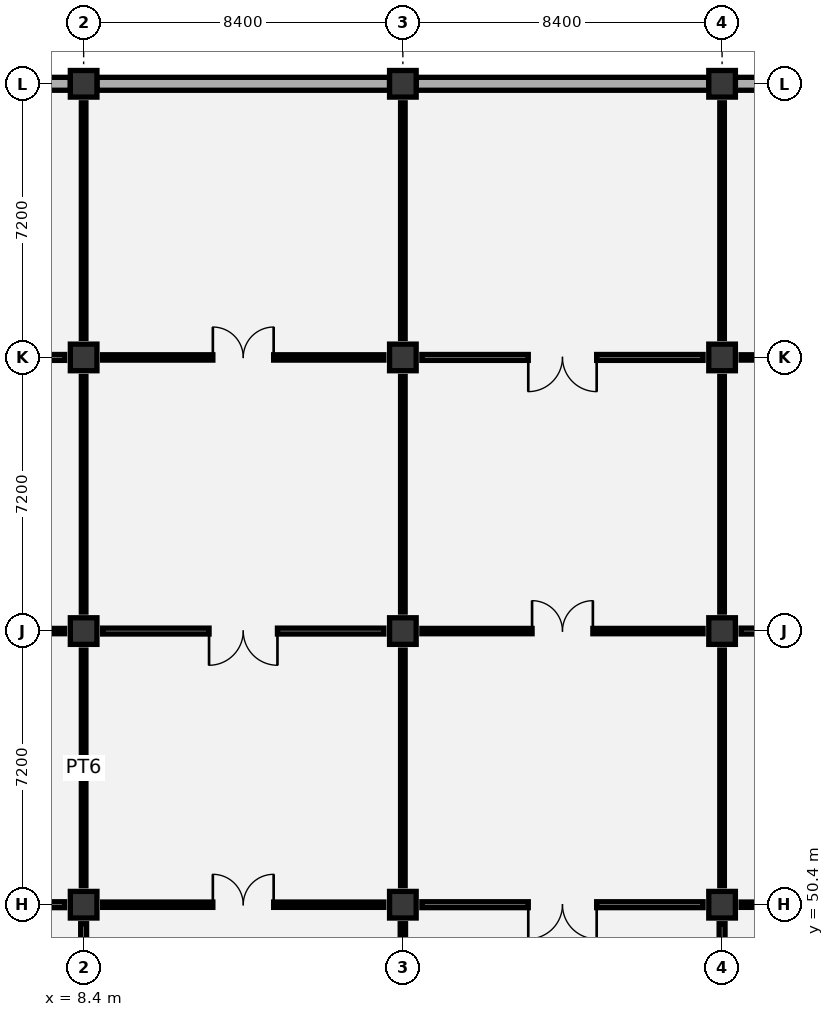
"""IFC4 building model, lengths in metres.
Left out: names, types, materials, properties, quantities, classifications, styles, units other than length and angle.
Written with IfcOpenShell. Run it as: python <this file> out.ifc"""

import sys

from ifc_helpers import new_model, si_unit, direction, frame, frame_2d, origin, origin_2d, place, context, subcontext, project, spatial, rectangle, extrude, element, fill, save


model = new_model("IFC4")
c1 = context("Model", 3, precision=1e-05, world=origin(), true_north=direction((0.0, 1.0)))
c2 = subcontext(c1, "Body", "Model", "MODEL_VIEW")
j1 = project(units=[si_unit("LENGTHUNIT", "METRE"), si_unit("PLANEANGLEUNIT", "RADIAN")], contexts=[c1])
p1 = place(None, origin())
s1 = spatial("IfcSite", under=j1, at=p1, CompositionType="ELEMENT")
p2 = place(p1, origin())
s2 = spatial("IfcBuilding", under=s1, at=p2, CompositionType="ELEMENT")
p3 = place(p2, frame((0.0, 0.0, 6.0)))
s3 = spatial("IfcBuildingStorey", under=s2, at=p3, CompositionType="ELEMENT", Elevation=6.0)
for number, where, z_axis, x_axis in (
    (1, (8.4, 50.4, 0.0), (0.0, 0.0, 1.0), (1.0, 0.0, 0.0)),
    (2, (8.4, 57.6, 0.0), (0.0, 0.0, 1.0), (1.0, 0.0, 0.0)),
    (3, (8.4, 64.8, 0.0), (0.0, 0.0, 1.0), (1.0, 0.0, 0.0)),
    (4, (8.4, 72.0, 0.0), (0.0, 0.0, 1.0), (1.0, 0.0, 0.0)),
    (5, (16.8, 50.4, 0.0), (0.0, 0.0, 1.0), (1.0, 0.0, 0.0)),
    (6, (16.8, 57.6, 0.0), (0.0, 0.0, 1.0), (1.0, 0.0, 0.0)),
    (7, (16.8, 64.8, 0.0), (0.0, 0.0, 1.0), (1.0, 0.0, 0.0)),
    (8, (16.8, 72.0, 0.0), (0.0, 0.0, 1.0), (1.0, 0.0, 0.0)),
    (9, (25.2, 50.4, 0.0), (0.0, 0.0, 1.0), (1.0, 0.0, 0.0)),
    (10, (25.2, 57.6, 0.0), (0.0, 0.0, 1.0), (1.0, 0.0, 0.0)),
    (11, (25.2, 64.8, 0.0), (0.0, 0.0, 1.0), (1.0, 0.0, 0.0)),
    (12, (25.2, 72.0, 0.0), (0.0, 0.0, 1.0), (1.0, 0.0, 0.0)),
):
    element("IfcColumn", number, at=place(p3, frame(where, z_axis=z_axis, x_axis=x_axis)), inside=s3, PredefinedType="COLUMN", context=c2, shape_type="SweptSolid", body=[
        extrude(rectangle(XDim=0.7, YDim=0.7, at=origin_2d()), origin(), (0.0, 0.0, 1.0), 5.4),
    ])
p4 = place(p3, frame((0.4, 72.0, 0.0), z_axis=(0.0, 0.0, 1.0), x_axis=(1.0, 0.0, 0.0)))
e13 = element("IfcWall", 13, at=p4, inside=s3, PredefinedType="SOLIDWALL", context=c2, shape_type="SweptSolid", body=[
    extrude(rectangle(XDim=7.65, YDim=0.34, at=frame_2d((3.825, 0.0))), origin(), (0.0, 0.0, 1.0), 4.52),
])
p5 = place(p3, frame((8.75, 72.0, 0.0), z_axis=(0.0, 0.0, 1.0), x_axis=(1.0, 0.0, 0.0)))
e14 = element("IfcWall", 14, at=p5, inside=s3, PredefinedType="SOLIDWALL", context=c2, shape_type="SweptSolid", body=[
    extrude(rectangle(XDim=7.7, YDim=0.34, at=frame_2d((3.85, 0.0))), origin(), (0.0, 0.0, 1.0), 4.42),
])
p6 = place(p3, frame((17.15, 72.0, 0.0), z_axis=(0.0, 0.0, 1.0), x_axis=(1.0, 0.0, 0.0)))
e15 = element("IfcWall", 15, at=p6, inside=s3, PredefinedType="SOLIDWALL", context=c2, shape_type="SweptSolid", body=[
    extrude(rectangle(XDim=7.7, YDim=0.34, at=frame_2d((3.85, 0.0))), origin(), (0.0, 0.0, 1.0), 4.42),
])
p7 = place(p3, frame((25.55, 72.0, 0.0), z_axis=(0.0, 0.0, 1.0), x_axis=(1.0, 0.0, 0.0)))
e16 = element("IfcWall", 16, at=p7, inside=s3, PredefinedType="SOLIDWALL", context=c2, shape_type="SweptSolid", body=[
    extrude(rectangle(XDim=7.7, YDim=0.34, at=frame_2d((3.85, 0.0))), origin(), (0.0, 0.0, 1.0), 4.42),
])
p8 = place(p3, frame((8.4, 43.7, 0.0), z_axis=(0.0, 0.0, 1.0), x_axis=(0.0, 1.0, 0.0)))
e17 = element("IfcWall", 17, at=p8, inside=s3, PredefinedType="PARTITIONING", context=c2, shape_type="SweptSolid", body=[
    extrude(rectangle(XDim=6.2, YDim=0.155, at=frame_2d((3.1, 0.0))), origin(), (0.0, 0.0, 1.0), 4.78),
])
p9 = place(p8, frame((2.3, 0.0, 0.0)))
e18 = element("IfcOpeningElement", 18, at=p9, cuts=e17, PredefinedType="OPENING", context=c2, shape_type="SweptSolid", body=[
    extrude(rectangle(XDim=1.6, YDim=2.2, at=frame_2d((0.8, 1.1))), frame((0.0, 0.087, 0.0), z_axis=(0.0, -1.0, 0.0), x_axis=(1.0, 0.0, 0.0)), (0.0, 0.0, 1.0), 0.175),
])
p10 = place(p3, frame((0.5, 50.4, 0.0), z_axis=(0.0, 0.0, 1.0), x_axis=(1.0, 0.0, 0.0)))
e19 = element("IfcWall", 19, at=p10, inside=s3, PredefinedType="PARTITIONING", context=c2, shape_type="SweptSolid", body=[
    extrude(rectangle(XDim=7.4, YDim=0.155, at=frame_2d((3.7, 0.0))), origin(), (0.0, 0.0, 1.0), 4.37),
])
p11 = place(p10, frame((2.8, 0.0, 0.0)))
e20 = element("IfcOpeningElement", 20, at=p11, cuts=e19, PredefinedType="OPENING", context=c2, shape_type="SweptSolid", body=[
    extrude(rectangle(XDim=1.8, YDim=2.25, at=frame_2d((0.9, 1.125))), frame((0.0, 0.087, 0.0), z_axis=(0.0, -1.0, 0.0), x_axis=(1.0, 0.0, 0.0)), (0.0, 0.0, 1.0), 0.175),
])
p12 = place(p3, frame((8.4, 50.9, 0.0), z_axis=(0.0, 0.0, 1.0), x_axis=(0.0, 1.0, 0.0)))
e21 = element("IfcWall", 21, at=p12, inside=s3, PredefinedType="PARTITIONING", context=c2, shape_type="SweptSolid", body=[
    extrude(rectangle(XDim=6.2, YDim=0.12, at=frame_2d((3.1, 0.0))), origin(), (0.0, 0.0, 1.0), 4.32),
])
p13 = place(p3, frame((0.5, 57.6, 0.0), z_axis=(0.0, 0.0, 1.0), x_axis=(1.0, 0.0, 0.0)))
e22 = element("IfcWall", 22, at=p13, inside=s3, PredefinedType="PARTITIONING", context=c2, shape_type="SweptSolid", body=[
    extrude(rectangle(XDim=7.4, YDim=0.14, at=frame_2d((3.7, 0.0))), origin(), (0.0, 0.0, 1.0), 4.37),
])
p14 = place(p13, frame((2.9, 0.0, 0.0)))
e23 = element("IfcOpeningElement", 23, at=p14, cuts=e22, PredefinedType="OPENING", context=c2, shape_type="SweptSolid", body=[
    extrude(rectangle(XDim=1.6, YDim=2.2, at=frame_2d((0.8, 1.1))), frame((0.0, 0.08, 0.0), z_axis=(0.0, -1.0, 0.0), x_axis=(1.0, 0.0, 0.0)), (0.0, 0.0, 1.0), 0.16),
])
p15 = place(p3, frame((8.4, 58.1, 0.0), z_axis=(0.0, 0.0, 1.0), x_axis=(0.0, 1.0, 0.0)))
e24 = element("IfcWall", 24, at=p15, inside=s3, PredefinedType="PARTITIONING", context=c2, shape_type="SweptSolid", body=[
    extrude(rectangle(XDim=6.2, YDim=0.12, at=frame_2d((3.1, 0.0))), origin(), (0.0, 0.0, 1.0), 4.57),
])
p16 = place(p3, frame((0.5, 64.8, 0.0), z_axis=(0.0, 0.0, 1.0), x_axis=(1.0, 0.0, 0.0)))
e25 = element("IfcWall", 25, at=p16, inside=s3, PredefinedType="PARTITIONING", context=c2, shape_type="SweptSolid", body=[
    extrude(rectangle(XDim=7.4, YDim=0.155, at=frame_2d((3.7, 0.0))), origin(), (0.0, 0.0, 1.0), 4.37),
])
p17 = place(p16, frame((2.8, 0.0, 0.0)))
e26 = element("IfcOpeningElement", 26, at=p17, cuts=e25, PredefinedType="OPENING", context=c2, shape_type="SweptSolid", body=[
    extrude(rectangle(XDim=1.8, YDim=2.25, at=frame_2d((0.9, 1.125))), frame((0.0, 0.087, 0.0), z_axis=(0.0, -1.0, 0.0), x_axis=(1.0, 0.0, 0.0)), (0.0, 0.0, 1.0), 0.175),
])
p18 = place(p3, frame((8.4, 65.3, 0.0), z_axis=(0.0, 0.0, 1.0), x_axis=(0.0, 1.0, 0.0)))
e27 = element("IfcWall", 27, at=p18, inside=s3, PredefinedType="PARTITIONING", context=c2, shape_type="SweptSolid", body=[
    extrude(rectangle(XDim=6.2, YDim=0.12, at=frame_2d((3.1, 0.0))), origin(), (0.0, 0.0, 1.0), 4.32),
])
p19 = place(p3, frame((16.8, 43.7, 0.0), z_axis=(0.0, 0.0, 1.0), x_axis=(0.0, 1.0, 0.0)))
e28 = element("IfcWall", 28, at=p19, inside=s3, PredefinedType="PARTITIONING", context=c2, shape_type="SweptSolid", body=[
    extrude(rectangle(XDim=6.2, YDim=0.14, at=frame_2d((3.1, 0.0))), origin(), (0.0, 0.0, 1.0), 4.32),
])
p20 = place(p19, frame((2.2, 0.0, 0.0)))
e29 = element("IfcOpeningElement", 29, at=p20, cuts=e28, PredefinedType="OPENING", context=c2, shape_type="SweptSolid", body=[
    extrude(rectangle(XDim=1.8, YDim=2.25, at=frame_2d((0.9, 1.125))), frame((0.0, 0.08, 0.0), z_axis=(0.0, -1.0, 0.0), x_axis=(1.0, 0.0, 0.0)), (0.0, 0.0, 1.0), 0.16),
])
p21 = place(p3, frame((8.9, 50.4, 0.0), z_axis=(0.0, 0.0, 1.0), x_axis=(1.0, 0.0, 0.0)))
e30 = element("IfcWall", 30, at=p21, inside=s3, PredefinedType="PARTITIONING", context=c2, shape_type="SweptSolid", body=[
    extrude(rectangle(XDim=7.4, YDim=0.14, at=frame_2d((3.7, 0.0))), origin(), (0.0, 0.0, 1.0), 4.27),
])
p22 = place(p21, frame((2.9, 0.0, 0.0)))
e31 = element("IfcOpeningElement", 31, at=p22, cuts=e30, PredefinedType="OPENING", context=c2, shape_type="SweptSolid", body=[
    extrude(rectangle(XDim=1.6, YDim=2.2, at=frame_2d((0.8, 1.1))), frame((0.0, 0.08, 0.0), z_axis=(0.0, -1.0, 0.0), x_axis=(1.0, 0.0, 0.0)), (0.0, 0.0, 1.0), 0.16),
])
p23 = place(p3, frame((16.8, 50.9, 0.0), z_axis=(0.0, 0.0, 1.0), x_axis=(0.0, 1.0, 0.0)))
e32 = element("IfcWall", 32, at=p23, inside=s3, PredefinedType="PARTITIONING", context=c2, shape_type="SweptSolid", body=[
    extrude(rectangle(XDim=6.2, YDim=0.12, at=frame_2d((3.1, 0.0))), origin(), (0.0, 0.0, 1.0), 4.57),
])
p24 = place(p3, frame((8.9, 57.6, 0.0), z_axis=(0.0, 0.0, 1.0), x_axis=(1.0, 0.0, 0.0)))
e33 = element("IfcWall", 33, at=p24, inside=s3, PredefinedType="PARTITIONING", context=c2, shape_type="SweptSolid", body=[
    extrude(rectangle(XDim=7.4, YDim=0.155, at=frame_2d((3.7, 0.0))), origin(), (0.0, 0.0, 1.0), 4.27),
])
p25 = place(p24, frame((2.8, 0.0, 0.0)))
e34 = element("IfcOpeningElement", 34, at=p25, cuts=e33, PredefinedType="OPENING", context=c2, shape_type="SweptSolid", body=[
    extrude(rectangle(XDim=1.8, YDim=2.25, at=frame_2d((0.9, 1.125))), frame((0.0, 0.087, 0.0), z_axis=(0.0, -1.0, 0.0), x_axis=(1.0, 0.0, 0.0)), (0.0, 0.0, 1.0), 0.175),
])
p26 = place(p3, frame((16.8, 58.1, 0.0), z_axis=(0.0, 0.0, 1.0), x_axis=(0.0, 1.0, 0.0)))
e35 = element("IfcWall", 35, at=p26, inside=s3, PredefinedType="PARTITIONING", context=c2, shape_type="SweptSolid", body=[
    extrude(rectangle(XDim=6.2, YDim=0.12, at=frame_2d((3.1, 0.0))), origin(), (0.0, 0.0, 1.0), 4.32),
])
p27 = place(p3, frame((8.9, 64.8, 0.0), z_axis=(0.0, 0.0, 1.0), x_axis=(1.0, 0.0, 0.0)))
e36 = element("IfcWall", 36, at=p27, inside=s3, PredefinedType="PARTITIONING", context=c2, shape_type="SweptSolid", body=[
    extrude(rectangle(XDim=7.4, YDim=0.14, at=frame_2d((3.7, 0.0))), origin(), (0.0, 0.0, 1.0), 4.27),
])
p28 = place(p27, frame((2.9, 0.0, 0.0)))
e37 = element("IfcOpeningElement", 37, at=p28, cuts=e36, PredefinedType="OPENING", context=c2, shape_type="SweptSolid", body=[
    extrude(rectangle(XDim=1.6, YDim=2.2, at=frame_2d((0.8, 1.1))), frame((0.0, 0.08, 0.0), z_axis=(0.0, -1.0, 0.0), x_axis=(1.0, 0.0, 0.0)), (0.0, 0.0, 1.0), 0.16),
])
p29 = place(p3, frame((16.8, 65.3, 0.0), z_axis=(0.0, 0.0, 1.0), x_axis=(0.0, 1.0, 0.0)))
e38 = element("IfcWall", 38, at=p29, inside=s3, PredefinedType="PARTITIONING", context=c2, shape_type="SweptSolid", body=[
    extrude(rectangle(XDim=6.2, YDim=0.12, at=frame_2d((3.1, 0.0))), origin(), (0.0, 0.0, 1.0), 4.67),
])
p30 = place(p3, frame((25.2, 43.7, 0.0), z_axis=(0.0, 0.0, 1.0), x_axis=(0.0, 1.0, 0.0)))
e39 = element("IfcWall", 39, at=p30, inside=s3, PredefinedType="PARTITIONING", context=c2, shape_type="SweptSolid", body=[
    extrude(rectangle(XDim=6.2, YDim=0.155, at=frame_2d((3.1, 0.0))), origin(), (0.0, 0.0, 1.0), 4.57),
])
p31 = place(p30, frame((2.3, 0.0, 0.0)))
e40 = element("IfcOpeningElement", 40, at=p31, cuts=e39, PredefinedType="OPENING", context=c2, shape_type="SweptSolid", body=[
    extrude(rectangle(XDim=1.6, YDim=2.2, at=frame_2d((0.8, 1.1))), frame((0.0, 0.087, 0.0), z_axis=(0.0, -1.0, 0.0), x_axis=(1.0, 0.0, 0.0)), (0.0, 0.0, 1.0), 0.175),
])
p32 = place(p3, frame((17.3, 50.4, 0.0), z_axis=(0.0, 0.0, 1.0), x_axis=(1.0, 0.0, 0.0)))
e41 = element("IfcWall", 41, at=p32, inside=s3, PredefinedType="PARTITIONING", context=c2, shape_type="SweptSolid", body=[
    extrude(rectangle(XDim=7.4, YDim=0.155, at=frame_2d((3.7, 0.0))), origin(), (0.0, 0.0, 1.0), 4.27),
])
p33 = place(p32, frame((2.8, 0.0, 0.0)))
e42 = element("IfcOpeningElement", 42, at=p33, cuts=e41, PredefinedType="OPENING", context=c2, shape_type="SweptSolid", body=[
    extrude(rectangle(XDim=1.8, YDim=2.25, at=frame_2d((0.9, 1.125))), frame((0.0, 0.087, 0.0), z_axis=(0.0, -1.0, 0.0), x_axis=(1.0, 0.0, 0.0)), (0.0, 0.0, 1.0), 0.175),
])
p34 = place(p3, frame((25.2, 50.9, 0.0), z_axis=(0.0, 0.0, 1.0), x_axis=(0.0, 1.0, 0.0)))
e43 = element("IfcWall", 43, at=p34, inside=s3, PredefinedType="PARTITIONING", context=c2, shape_type="SweptSolid", body=[
    extrude(rectangle(XDim=6.2, YDim=0.12, at=frame_2d((3.1, 0.0))), origin(), (0.0, 0.0, 1.0), 4.32),
])
p35 = place(p3, frame((17.3, 57.6, 0.0), z_axis=(0.0, 0.0, 1.0), x_axis=(1.0, 0.0, 0.0)))
e44 = element("IfcWall", 44, at=p35, inside=s3, PredefinedType="PARTITIONING", context=c2, shape_type="SweptSolid", body=[
    extrude(rectangle(XDim=7.4, YDim=0.14, at=frame_2d((3.7, 0.0))), origin(), (0.0, 0.0, 1.0), 4.27),
])
p36 = place(p35, frame((2.9, 0.0, 0.0)))
e45 = element("IfcOpeningElement", 45, at=p36, cuts=e44, PredefinedType="OPENING", context=c2, shape_type="SweptSolid", body=[
    extrude(rectangle(XDim=1.6, YDim=2.2, at=frame_2d((0.8, 1.1))), frame((0.0, 0.08, 0.0), z_axis=(0.0, -1.0, 0.0), x_axis=(1.0, 0.0, 0.0)), (0.0, 0.0, 1.0), 0.16),
])
p37 = place(p3, frame((25.2, 58.1, 0.0), z_axis=(0.0, 0.0, 1.0), x_axis=(0.0, 1.0, 0.0)))
e46 = element("IfcWall", 46, at=p37, inside=s3, PredefinedType="PARTITIONING", context=c2, shape_type="SweptSolid", body=[
    extrude(rectangle(XDim=6.2, YDim=0.12, at=frame_2d((3.1, 0.0))), origin(), (0.0, 0.0, 1.0), 4.67),
])
p38 = place(p3, frame((17.3, 64.8, 0.0), z_axis=(0.0, 0.0, 1.0), x_axis=(1.0, 0.0, 0.0)))
e47 = element("IfcWall", 47, at=p38, inside=s3, PredefinedType="PARTITIONING", context=c2, shape_type="SweptSolid", body=[
    extrude(rectangle(XDim=7.4, YDim=0.155, at=frame_2d((3.7, 0.0))), origin(), (0.0, 0.0, 1.0), 4.27),
])
p39 = place(p38, frame((2.8, 0.0, 0.0)))
e48 = element("IfcOpeningElement", 48, at=p39, cuts=e47, PredefinedType="OPENING", context=c2, shape_type="SweptSolid", body=[
    extrude(rectangle(XDim=1.8, YDim=2.25, at=frame_2d((0.9, 1.125))), frame((0.0, 0.087, 0.0), z_axis=(0.0, -1.0, 0.0), x_axis=(1.0, 0.0, 0.0)), (0.0, 0.0, 1.0), 0.175),
])
p40 = place(p3, frame((25.2, 65.3, 0.0), z_axis=(0.0, 0.0, 1.0), x_axis=(0.0, 1.0, 0.0)))
e49 = element("IfcWall", 49, at=p40, inside=s3, PredefinedType="PARTITIONING", context=c2, shape_type="SweptSolid", body=[
    extrude(rectangle(XDim=6.2, YDim=0.12, at=frame_2d((3.1, 0.0))), origin(), (0.0, 0.0, 1.0), 4.32),
])
p41 = place(p3, frame((25.7, 50.4, 0.0), z_axis=(0.0, 0.0, 1.0), x_axis=(1.0, 0.0, 0.0)))
e50 = element("IfcWall", 50, at=p41, inside=s3, PredefinedType="PARTITIONING", context=c2, shape_type="SweptSolid", body=[
    extrude(rectangle(XDim=7.4, YDim=0.14, at=frame_2d((3.7, 0.0))), origin(), (0.0, 0.0, 1.0), 4.27),
])
p42 = place(p41, frame((2.9, 0.0, 0.0)))
e51 = element("IfcOpeningElement", 51, at=p42, cuts=e50, PredefinedType="OPENING", context=c2, shape_type="SweptSolid", body=[
    extrude(rectangle(XDim=1.6, YDim=2.2, at=frame_2d((0.8, 1.1))), frame((0.0, 0.08, 0.0), z_axis=(0.0, -1.0, 0.0), x_axis=(1.0, 0.0, 0.0)), (0.0, 0.0, 1.0), 0.16),
])
p43 = place(p3, frame((25.7, 57.6, 0.0), z_axis=(0.0, 0.0, 1.0), x_axis=(1.0, 0.0, 0.0)))
e52 = element("IfcWall", 52, at=p43, inside=s3, PredefinedType="PARTITIONING", context=c2, shape_type="SweptSolid", body=[
    extrude(rectangle(XDim=7.4, YDim=0.155, at=frame_2d((3.7, 0.0))), origin(), (0.0, 0.0, 1.0), 4.27),
])
p44 = place(p43, frame((2.8, 0.0, 0.0)))
e53 = element("IfcOpeningElement", 53, at=p44, cuts=e52, PredefinedType="OPENING", context=c2, shape_type="SweptSolid", body=[
    extrude(rectangle(XDim=1.8, YDim=2.25, at=frame_2d((0.9, 1.125))), frame((0.0, 0.087, 0.0), z_axis=(0.0, -1.0, 0.0), x_axis=(1.0, 0.0, 0.0)), (0.0, 0.0, 1.0), 0.175),
])
p45 = place(p3, frame((25.7, 64.8, 0.0), z_axis=(0.0, 0.0, 1.0), x_axis=(1.0, 0.0, 0.0)))
e54 = element("IfcWall", 54, at=p45, inside=s3, PredefinedType="PARTITIONING", context=c2, shape_type="SweptSolid", body=[
    extrude(rectangle(XDim=7.4, YDim=0.14, at=frame_2d((3.7, 0.0))), origin(), (0.0, 0.0, 1.0), 4.27),
])
p46 = place(p45, frame((2.9, 0.0, 0.0)))
e55 = element("IfcOpeningElement", 55, at=p46, cuts=e54, PredefinedType="OPENING", context=c2, shape_type="SweptSolid", body=[
    extrude(rectangle(XDim=1.6, YDim=2.2, at=frame_2d((0.8, 1.1))), frame((0.0, 0.08, 0.0), z_axis=(0.0, -1.0, 0.0), x_axis=(1.0, 0.0, 0.0)), (0.0, 0.0, 1.0), 0.16),
])
p47 = place(p22, origin())
e56 = element("IfcDoor", 56, at=p47, inside=s3, OperationType="DOUBLE_DOOR_SINGLE_SWING", PredefinedType="DOOR", context=c2, shape_type="SweptSolid", body=[
    extrude(rectangle(XDim=1.6, YDim=2.2, at=frame_2d((0.8, 1.1))), frame((0.0, 0.025, 0.0), z_axis=(0.0, -1.0, 0.0), x_axis=(1.0, 0.0, 0.0)), (0.0, 0.0, 1.0), 0.05),
])
fill(e31, e56)
p48 = place(p25, frame((1.8, 0.0, 0.0), z_axis=(0.0, 0.0, 1.0), x_axis=(-1.0, 0.0, 0.0)))
e57 = element("IfcDoor", 57, at=p48, inside=s3, OperationType="DOUBLE_DOOR_SINGLE_SWING", PredefinedType="DOOR", context=c2, shape_type="SweptSolid", body=[
    extrude(rectangle(XDim=1.8, YDim=2.25, at=frame_2d((0.9, 1.125))), frame((0.0, 0.025, 0.0), z_axis=(0.0, -1.0, 0.0), x_axis=(1.0, 0.0, 0.0)), (0.0, 0.0, 1.0), 0.05),
])
fill(e34, e57)
p49 = place(p28, origin())
e58 = element("IfcDoor", 58, at=p49, inside=s3, OperationType="DOUBLE_DOOR_SINGLE_SWING", PredefinedType="DOOR", context=c2, shape_type="SweptSolid", body=[
    extrude(rectangle(XDim=1.6, YDim=2.2, at=frame_2d((0.8, 1.1))), frame((0.0, 0.025, 0.0), z_axis=(0.0, -1.0, 0.0), x_axis=(1.0, 0.0, 0.0)), (0.0, 0.0, 1.0), 0.05),
])
fill(e37, e58)
p50 = place(p33, frame((1.8, 0.0, 0.0), z_axis=(0.0, 0.0, 1.0), x_axis=(-1.0, 0.0, 0.0)))
e59 = element("IfcDoor", 59, at=p50, inside=s3, OperationType="DOUBLE_DOOR_SINGLE_SWING", PredefinedType="DOOR", context=c2, shape_type="SweptSolid", body=[
    extrude(rectangle(XDim=1.8, YDim=2.25, at=frame_2d((0.9, 1.125))), frame((0.0, 0.025, 0.0), z_axis=(0.0, -1.0, 0.0), x_axis=(1.0, 0.0, 0.0)), (0.0, 0.0, 1.0), 0.05),
])
fill(e42, e59)
p51 = place(p36, origin())
e60 = element("IfcDoor", 60, at=p51, inside=s3, OperationType="DOUBLE_DOOR_SINGLE_SWING", PredefinedType="DOOR", context=c2, shape_type="SweptSolid", body=[
    extrude(rectangle(XDim=1.6, YDim=2.2, at=frame_2d((0.8, 1.1))), frame((0.0, 0.025, 0.0), z_axis=(0.0, -1.0, 0.0), x_axis=(1.0, 0.0, 0.0)), (0.0, 0.0, 1.0), 0.05),
])
fill(e45, e60)
p52 = place(p39, frame((1.8, 0.0, 0.0), z_axis=(0.0, 0.0, 1.0), x_axis=(-1.0, 0.0, 0.0)))
e61 = element("IfcDoor", 61, at=p52, inside=s3, OperationType="DOUBLE_DOOR_SINGLE_SWING", PredefinedType="DOOR", context=c2, shape_type="SweptSolid", body=[
    extrude(rectangle(XDim=1.8, YDim=2.25, at=frame_2d((0.9, 1.125))), frame((0.0, 0.025, 0.0), z_axis=(0.0, -1.0, 0.0), x_axis=(1.0, 0.0, 0.0)), (0.0, 0.0, 1.0), 0.05),
])
fill(e48, e61)
save(model, sys.argv[1])
